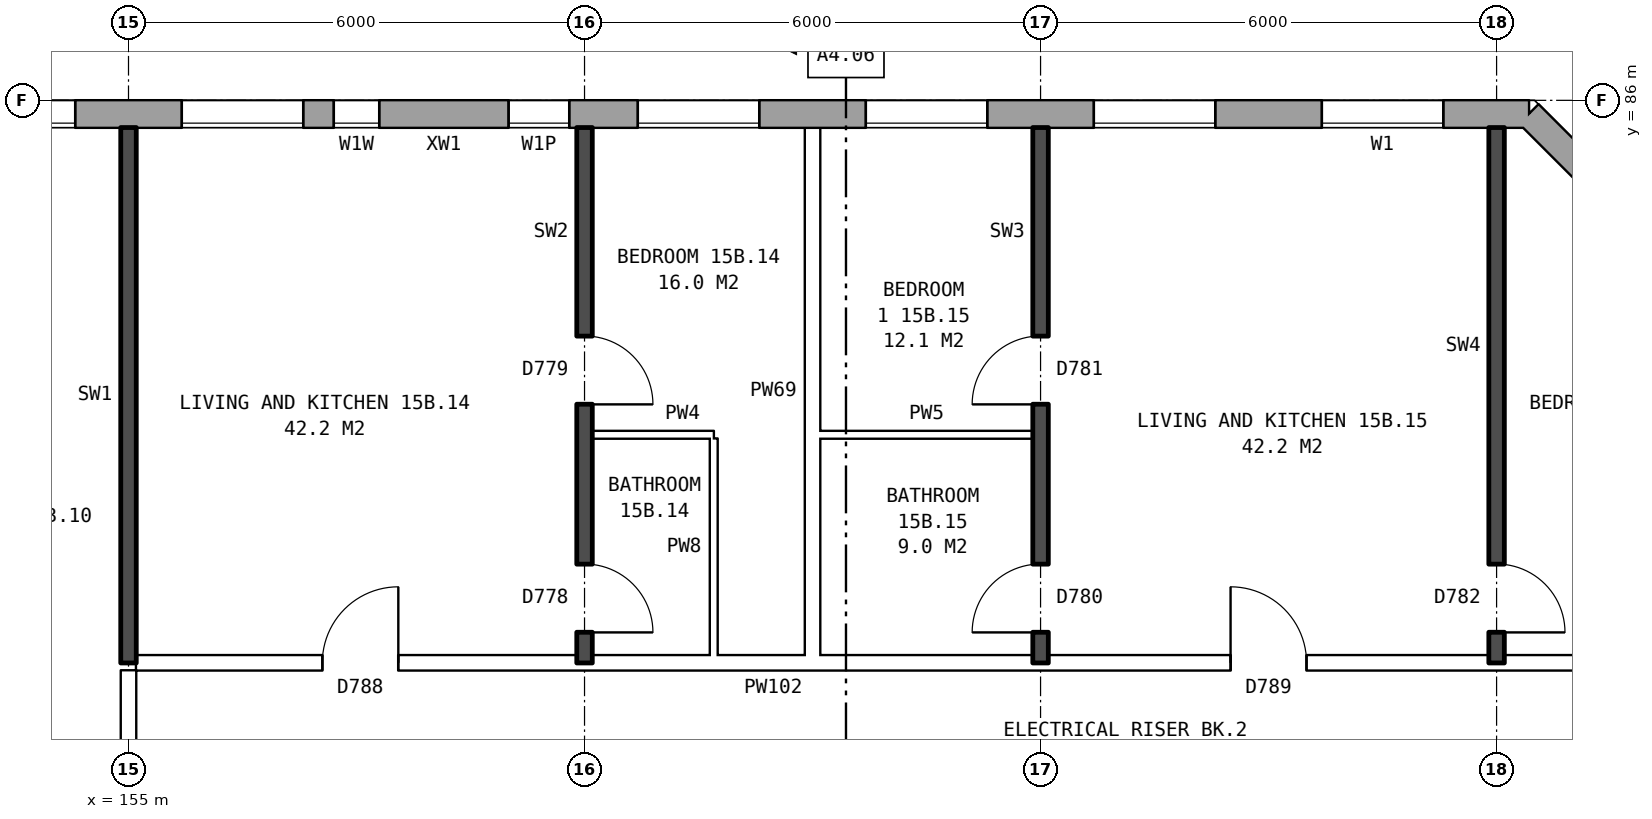
"""IFC4 building model, lengths in metres.
Left out: names, types, materials, properties, quantities, classifications, styles, units other than length and angle.
Written with IfcOpenShell. Run it as: python <this file> out.ifc"""

import sys

from ifc_helpers import new_model, si_unit, direction, frame, frame_2d, origin, place, context, subcontext, project, spatial, rectangle, extrude, element, fill, save


model = new_model("IFC4")
c1 = context("Model", 3, precision=1e-05, world=origin(), true_north=direction((0.0, 1.0)))
c2 = subcontext(c1, "Body", "Model", "MODEL_VIEW")
j1 = project(units=[si_unit("LENGTHUNIT", "METRE"), si_unit("PLANEANGLEUNIT", "RADIAN")], contexts=[c1])
p1 = place(None, origin())
s1 = spatial("IfcSite", under=j1, at=p1, CompositionType="ELEMENT")
p2 = place(p1, origin())
s2 = spatial("IfcBuilding", under=s1, at=p2, CompositionType="ELEMENT")
p3 = place(p2, frame((0.0, 0.0, 56.7)))
s3 = spatial("IfcBuildingStorey", under=s2, at=p3, CompositionType="ELEMENT", Elevation=56.7)
p4 = place(p3, frame((176.32, 82.925, 0.0), z_axis=(0.0, 0.0, 1.0), x_axis=(-0.707106781187, 0.707106781187, 0.0)))
e1 = element("IfcWall", 1, at=p4, inside=s3, PredefinedType="STANDARD", context=c2, shape_type="SweptSolid", body=[
    extrude(rectangle(XDim=4.094, YDim=0.36, at=frame_2d((2.047, 0.0))), origin(), (0.0, 0.0, 1.0), 2.85),
])
p5 = place(p4, frame((1.247, 0.0, 0.8)))
e2 = element("IfcOpeningElement", 2, at=p5, cuts=e1, PredefinedType="OPENING", context=c2, shape_type="SweptSolid", body=[
    extrude(rectangle(XDim=1.6, YDim=1.8, at=frame_2d((0.8, 0.9))), frame((0.0, 0.19, 0.0), z_axis=(0.0, -1.0, 0.0), x_axis=(1.0, 0.0, 0.0)), (0.0, 0.0, 1.0), 0.38),
])
p6 = place(p3, frame((173.425, 85.82, 0.0), z_axis=(0.0, 0.0, 1.0), x_axis=(-1.0, 0.0, 0.0)))
e3 = element("IfcWall", 3, at=p6, inside=s3, PredefinedType="STANDARD", context=c2, shape_type="SweptSolid", body=[
    extrude(rectangle(XDim=39.351, YDim=0.36, at=frame_2d((19.675, 0.0))), origin(), (0.0, 0.0, 1.0), 2.85),
])
p7 = place(p6, frame((1.125, 0.0, 0.8)))
e4 = element("IfcOpeningElement", 4, at=p7, cuts=e3, PredefinedType="OPENING", context=c2, shape_type="SweptSolid", body=[
    extrude(rectangle(XDim=1.6, YDim=1.8, at=frame_2d((0.8, 0.9))), frame((0.0, 0.19, 0.0), z_axis=(0.0, -1.0, 0.0), x_axis=(1.0, 0.0, 0.0)), (0.0, 0.0, 1.0), 0.38),
])
p8 = place(p6, frame((4.125, 0.0, 0.8)))
e5 = element("IfcOpeningElement", 5, at=p8, cuts=e3, PredefinedType="OPENING", context=c2, shape_type="SweptSolid", body=[
    extrude(rectangle(XDim=1.6, YDim=1.8, at=frame_2d((0.8, 0.9))), frame((0.0, 0.19, 0.0), z_axis=(0.0, -1.0, 0.0), x_axis=(1.0, 0.0, 0.0)), (0.0, 0.0, 1.0), 0.38),
])
p9 = place(p6, frame((7.125, 0.0, 0.8)))
e6 = element("IfcOpeningElement", 6, at=p9, cuts=e3, PredefinedType="OPENING", context=c2, shape_type="SweptSolid", body=[
    extrude(rectangle(XDim=1.6, YDim=1.8, at=frame_2d((0.8, 0.9))), frame((0.0, 0.19, 0.0), z_axis=(0.0, -1.0, 0.0), x_axis=(1.0, 0.0, 0.0)), (0.0, 0.0, 1.0), 0.38),
])
p10 = place(p6, frame((10.125, 0.0, 0.8)))
e7 = element("IfcOpeningElement", 7, at=p10, cuts=e3, PredefinedType="OPENING", context=c2, shape_type="SweptSolid", body=[
    extrude(rectangle(XDim=1.6, YDim=1.8, at=frame_2d((0.8, 0.9))), frame((0.0, 0.19, 0.0), z_axis=(0.0, -1.0, 0.0), x_axis=(1.0, 0.0, 0.0)), (0.0, 0.0, 1.0), 0.38),
])
p11 = place(p6, frame((12.625, 0.0, 1.25)))
e8 = element("IfcOpeningElement", 8, at=p11, cuts=e3, PredefinedType="OPENING", context=c2, shape_type="SweptSolid", body=[
    extrude(rectangle(XDim=0.8, YDim=1.2, at=frame_2d((0.4, 0.6))), frame((0.0, 0.19, 0.0), z_axis=(0.0, -1.0, 0.0), x_axis=(1.0, 0.0, 0.0)), (0.0, 0.0, 1.0), 0.38),
])
p12 = place(p6, frame((16.125, 0.0, 0.8)))
e9 = element("IfcOpeningElement", 9, at=p12, cuts=e3, PredefinedType="OPENING", context=c2, shape_type="SweptSolid", body=[
    extrude(rectangle(XDim=1.6, YDim=1.8, at=frame_2d((0.8, 0.9))), frame((0.0, 0.19, 0.0), z_axis=(0.0, -1.0, 0.0), x_axis=(1.0, 0.0, 0.0)), (0.0, 0.0, 1.0), 0.38),
])
p13 = place(p6, frame((19.125, 0.0, 0.8)))
e10 = element("IfcOpeningElement", 10, at=p13, cuts=e3, PredefinedType="OPENING", context=c2, shape_type="SweptSolid", body=[
    extrude(rectangle(XDim=1.6, YDim=1.8, at=frame_2d((0.8, 0.9))), frame((0.0, 0.19, 0.0), z_axis=(0.0, -1.0, 0.0), x_axis=(1.0, 0.0, 0.0)), (0.0, 0.0, 1.0), 0.38),
])
p14 = place(p6, frame((21.575, 0.0, 0.8)))
e11 = element("IfcOpeningElement", 11, at=p14, cuts=e3, PredefinedType="OPENING", context=c2, shape_type="SweptSolid", body=[
    extrude(rectangle(XDim=1.4, YDim=1.8, at=frame_2d((0.7, 0.9))), frame((0.0, 0.19, 0.0), z_axis=(0.0, -1.0, 0.0), x_axis=(1.0, 0.0, 0.0)), (0.0, 0.0, 1.0), 0.38),
])
p15 = place(p6, frame((25.275, 0.0, 1.7)))
e12 = element("IfcOpeningElement", 12, at=p15, cuts=e3, PredefinedType="OPENING", context=c2, shape_type="SweptSolid", body=[
    extrude(rectangle(XDim=0.8, YDim=0.9, at=frame_2d((0.4, 0.45))), frame((0.0, 0.19, 0.0), z_axis=(0.0, -1.0, 0.0), x_axis=(1.0, 0.0, 0.0)), (0.0, 0.0, 1.0), 0.38),
])
p16 = place(p6, frame((28.125, 0.0, 0.8)))
e13 = element("IfcOpeningElement", 13, at=p16, cuts=e3, PredefinedType="OPENING", context=c2, shape_type="SweptSolid", body=[
    extrude(rectangle(XDim=1.6, YDim=1.8, at=frame_2d((0.8, 0.9))), frame((0.0, 0.19, 0.0), z_axis=(0.0, -1.0, 0.0), x_axis=(1.0, 0.0, 0.0)), (0.0, 0.0, 1.0), 0.38),
])
p17 = place(p6, frame((31.125, 0.0, 0.8)))
e14 = element("IfcOpeningElement", 14, at=p17, cuts=e3, PredefinedType="OPENING", context=c2, shape_type="SweptSolid", body=[
    extrude(rectangle(XDim=1.6, YDim=1.8, at=frame_2d((0.8, 0.9))), frame((0.0, 0.19, 0.0), z_axis=(0.0, -1.0, 0.0), x_axis=(1.0, 0.0, 0.0)), (0.0, 0.0, 1.0), 0.38),
])
p18 = place(p6, frame((34.125, 0.0, 0.8)))
e15 = element("IfcOpeningElement", 15, at=p18, cuts=e3, PredefinedType="OPENING", context=c2, shape_type="SweptSolid", body=[
    extrude(rectangle(XDim=1.6, YDim=1.8, at=frame_2d((0.8, 0.9))), frame((0.0, 0.19, 0.0), z_axis=(0.0, -1.0, 0.0), x_axis=(1.0, 0.0, 0.0)), (0.0, 0.0, 1.0), 0.38),
])
p19 = place(p6, frame((37.125, 0.0, 0.8)))
e16 = element("IfcOpeningElement", 16, at=p19, cuts=e3, PredefinedType="OPENING", context=c2, shape_type="SweptSolid", body=[
    extrude(rectangle(XDim=1.6, YDim=1.8, at=frame_2d((0.8, 0.9))), frame((0.0, 0.19, 0.0), z_axis=(0.0, -1.0, 0.0), x_axis=(1.0, 0.0, 0.0)), (0.0, 0.0, 1.0), 0.38),
])
p20 = place(p6, frame((15.125, 0.0, 0.65)))
e17 = element("IfcOpeningElement", 17, at=p20, cuts=e3, PredefinedType="OPENING", context=c2, shape_type="SweptSolid", body=[
    extrude(rectangle(XDim=0.6, YDim=0.9, at=frame_2d((0.3, 0.45))), frame((0.0, 0.19, 0.0), z_axis=(0.0, -1.0, 0.0), x_axis=(1.0, 0.0, 0.0)), (0.0, 0.0, 1.0), 0.38),
])
p21 = place(p6, frame((23.275, 0.0, 0.8)))
e18 = element("IfcOpeningElement", 18, at=p21, cuts=e3, PredefinedType="OPENING", context=c2, shape_type="SweptSolid", body=[
    extrude(rectangle(XDim=0.8, YDim=0.9, at=frame_2d((0.4, 0.45))), frame((0.0, 0.19, 0.0), z_axis=(0.0, -1.0, 0.0), x_axis=(1.0, 0.0, 0.0)), (0.0, 0.0, 1.0), 0.38),
])
p22 = place(p6, frame((26.375, 0.0, 0.8)))
e19 = element("IfcOpeningElement", 19, at=p22, cuts=e3, PredefinedType="OPENING", context=c2, shape_type="SweptSolid", body=[
    extrude(rectangle(XDim=0.8, YDim=1.8, at=frame_2d((0.4, 0.9))), frame((0.0, 0.19, 0.0), z_axis=(0.0, -1.0, 0.0), x_axis=(1.0, 0.0, 0.0)), (0.0, 0.0, 1.0), 0.38),
])
p23 = place(p3, frame((155.1, 78.6, 0.0), z_axis=(0.0, 0.0, 1.0), x_axis=(1.0, 0.0, 0.0)))
e20 = element("IfcWall", 20, at=p23, inside=s3, PredefinedType="PARTITIONING", context=c2, shape_type="SweptSolid", body=[
    extrude(rectangle(XDim=21.04, YDim=0.2, at=frame_2d((10.52, 0.0))), origin(), (0.0, 0.0, 1.0), 2.85),
])
p24 = place(p23, frame((2.45, 0.0, 0.0)))
e21 = element("IfcOpeningElement", 21, at=p24, cuts=e20, PredefinedType="OPENING", context=c2, shape_type="SweptSolid", body=[
    extrude(rectangle(XDim=1.0, YDim=2.1, at=frame_2d((0.5, 1.05))), frame((0.0, 0.11, 0.0), z_axis=(0.0, -1.0, 0.0), x_axis=(1.0, 0.0, 0.0)), (0.0, 0.0, 1.0), 0.22),
])
p25 = place(p23, frame((14.4, 0.0, 0.0)))
e22 = element("IfcOpeningElement", 22, at=p25, cuts=e20, PredefinedType="OPENING", context=c2, shape_type="SweptSolid", body=[
    extrude(rectangle(XDim=1.0, YDim=2.1, at=frame_2d((0.5, 1.05))), frame((0.0, 0.11, 0.0), z_axis=(0.0, -1.0, 0.0), x_axis=(1.0, 0.0, 0.0)), (0.0, 0.0, 1.0), 0.22),
])
p26 = place(p3, frame((161.1, 81.6, 0.0), z_axis=(0.0, 0.0, 1.0), x_axis=(1.0, 0.0, 0.0)))
e23 = element("IfcWall", 23, at=p26, inside=s3, PredefinedType="PARTITIONING", context=c2, shape_type="SweptSolid", body=[
    extrude(rectangle(XDim=1.6, YDim=0.1, at=frame_2d((0.8, 0.0))), origin(), (0.0, 0.0, 1.0), 2.85),
])
p27 = place(p3, frame((164.1, 81.6, 0.0), z_axis=(0.0, 0.0, 1.0), x_axis=(1.0, 0.0, 0.0)))
e24 = element("IfcWall", 24, at=p27, inside=s3, PredefinedType="PARTITIONING", context=c2, shape_type="SweptSolid", body=[
    extrude(rectangle(XDim=2.8, YDim=0.1, at=frame_2d((1.4, 0.0))), origin(), (0.0, 0.0, 1.0), 2.85),
])
p28 = place(p3, frame((155.0, 76.3, 0.0), z_axis=(0.0, 0.0, 1.0), x_axis=(0.0, 1.0, 0.0)))
e25 = element("IfcWall", 25, at=p28, inside=s3, PredefinedType="PARTITIONING", context=c2, shape_type="SweptSolid", body=[
    extrude(rectangle(XDim=2.2, YDim=0.2, at=frame_2d((1.1, 0.0))), origin(), (0.0, 0.0, 1.0), 2.85),
])
p29 = place(p3, frame((155.0, 78.6, 0.0), z_axis=(0.0, 0.0, 1.0), x_axis=(0.0, 1.0, 0.0)))
e26 = element("IfcWall", 26, at=p29, inside=s3, PredefinedType="SOLIDWALL", context=c2, shape_type="SweptSolid", body=[
    extrude(rectangle(XDim=7.04, YDim=0.2, at=frame_2d((3.52, 0.0))), origin(), (0.0, 0.0, 1.0), 2.85),
])
p30 = place(p3, frame((161.0, 78.6, 0.0), z_axis=(0.0, 0.0, 1.0), x_axis=(0.0, 1.0, 0.0)))
e27 = element("IfcWall", 27, at=p30, inside=s3, PredefinedType="SOLIDWALL", context=c2, shape_type="SweptSolid", body=[
    extrude(rectangle(XDim=7.04, YDim=0.2, at=frame_2d((3.52, 0.0))), origin(), (0.0, 0.0, 1.0), 2.85),
])
p31 = place(p30, frame((3.4, 0.0, 0.0)))
e28 = element("IfcOpeningElement", 28, at=p31, cuts=e27, PredefinedType="OPENING", context=c2, shape_type="SweptSolid", body=[
    extrude(rectangle(XDim=0.9, YDim=2.1, at=frame_2d((0.45, 1.05))), frame((0.0, 0.11, 0.0), z_axis=(0.0, -1.0, 0.0), x_axis=(1.0, 0.0, 0.0)), (0.0, 0.0, 1.0), 0.22),
])
p32 = place(p30, frame((0.4, 0.0, 0.0)))
e29 = element("IfcOpeningElement", 29, at=p32, cuts=e27, PredefinedType="OPENING", context=c2, shape_type="SweptSolid", body=[
    extrude(rectangle(XDim=0.9, YDim=2.1, at=frame_2d((0.45, 1.05))), frame((0.0, 0.11, 0.0), z_axis=(0.0, -1.0, 0.0), x_axis=(1.0, 0.0, 0.0)), (0.0, 0.0, 1.0), 0.22),
])
p33 = place(p3, frame((162.7, 78.7, 0.0), z_axis=(0.0, 0.0, 1.0), x_axis=(0.0, 1.0, 0.0)))
e30 = element("IfcWall", 30, at=p33, inside=s3, PredefinedType="PARTITIONING", context=c2, shape_type="SweptSolid", body=[
    extrude(rectangle(XDim=2.85, YDim=0.1, at=frame_2d((1.425, 0.0))), origin(), (0.0, 0.0, 1.0), 2.85),
])
p34 = place(p3, frame((164.0, 78.7, 0.0), z_axis=(0.0, 0.0, 1.0), x_axis=(0.0, 1.0, 0.0)))
e31 = element("IfcWall", 31, at=p34, inside=s3, PredefinedType="PARTITIONING", context=c2, shape_type="SweptSolid", body=[
    extrude(rectangle(XDim=6.94, YDim=0.2, at=frame_2d((3.47, 0.0))), origin(), (0.0, 0.0, 1.0), 2.85),
])
p35 = place(p3, frame((167.0, 78.6, 0.0), z_axis=(0.0, 0.0, 1.0), x_axis=(0.0, 1.0, 0.0)))
e32 = element("IfcWall", 32, at=p35, inside=s3, PredefinedType="SOLIDWALL", context=c2, shape_type="SweptSolid", body=[
    extrude(rectangle(XDim=7.04, YDim=0.2, at=frame_2d((3.52, 0.0))), origin(), (0.0, 0.0, 1.0), 2.85),
])
p36 = place(p35, frame((3.4, 0.0, 0.0)))
e33 = element("IfcOpeningElement", 33, at=p36, cuts=e32, PredefinedType="OPENING", context=c2, shape_type="SweptSolid", body=[
    extrude(rectangle(XDim=0.9, YDim=2.1, at=frame_2d((0.45, 1.05))), frame((0.0, 0.11, 0.0), z_axis=(0.0, -1.0, 0.0), x_axis=(1.0, 0.0, 0.0)), (0.0, 0.0, 1.0), 0.22),
])
p37 = place(p35, frame((0.4, 0.0, 0.0)))
e34 = element("IfcOpeningElement", 34, at=p37, cuts=e32, PredefinedType="OPENING", context=c2, shape_type="SweptSolid", body=[
    extrude(rectangle(XDim=0.9, YDim=2.1, at=frame_2d((0.45, 1.05))), frame((0.0, 0.11, 0.0), z_axis=(0.0, -1.0, 0.0), x_axis=(1.0, 0.0, 0.0)), (0.0, 0.0, 1.0), 0.22),
])
p38 = place(p3, frame((173.0, 78.6, 0.0), z_axis=(0.0, 0.0, 1.0), x_axis=(0.0, 1.0, 0.0)))
e35 = element("IfcWall", 35, at=p38, inside=s3, PredefinedType="SOLIDWALL", context=c2, shape_type="SweptSolid", body=[
    extrude(rectangle(XDim=7.04, YDim=0.2, at=frame_2d((3.52, 0.0))), origin(), (0.0, 0.0, 1.0), 2.85),
])
p39 = place(p38, frame((0.4, 0.0, 0.0)))
e36 = element("IfcOpeningElement", 36, at=p39, cuts=e35, PredefinedType="OPENING", context=c2, shape_type="SweptSolid", body=[
    extrude(rectangle(XDim=0.9, YDim=2.1, at=frame_2d((0.45, 1.05))), frame((0.0, 0.11, 0.0), z_axis=(0.0, -1.0, 0.0), x_axis=(1.0, 0.0, 0.0)), (0.0, 0.0, 1.0), 0.22),
])
p40 = place(p7, origin())
e37 = element("IfcWindow", 37, at=p40, inside=s3, PartitioningType="SINGLE_PANEL", PredefinedType="WINDOW", context=c2, shape_type="SweptSolid", body=[
    extrude(rectangle(XDim=1.6, YDim=1.8, at=frame_2d((0.8, 0.9))), frame((0.0, 0.15, 0.0), z_axis=(0.0, -1.0, 0.0), x_axis=(1.0, 0.0, 0.0)), (0.0, 0.0, 1.0), 0.06),
])
fill(e4, e37)
p41 = place(p8, origin())
e38 = element("IfcWindow", 38, at=p41, inside=s3, PartitioningType="SINGLE_PANEL", PredefinedType="WINDOW", context=c2, shape_type="SweptSolid", body=[
    extrude(rectangle(XDim=1.6, YDim=1.8, at=frame_2d((0.8, 0.9))), frame((0.0, 0.15, 0.0), z_axis=(0.0, -1.0, 0.0), x_axis=(1.0, 0.0, 0.0)), (0.0, 0.0, 1.0), 0.06),
])
fill(e5, e38)
p42 = place(p9, origin())
e39 = element("IfcWindow", 39, at=p42, inside=s3, PartitioningType="SINGLE_PANEL", PredefinedType="WINDOW", context=c2, shape_type="SweptSolid", body=[
    extrude(rectangle(XDim=1.6, YDim=1.8, at=frame_2d((0.8, 0.9))), frame((0.0, 0.15, 0.0), z_axis=(0.0, -1.0, 0.0), x_axis=(1.0, 0.0, 0.0)), (0.0, 0.0, 1.0), 0.06),
])
fill(e6, e39)
p43 = place(p10, origin())
e40 = element("IfcWindow", 40, at=p43, inside=s3, PartitioningType="SINGLE_PANEL", PredefinedType="WINDOW", context=c2, shape_type="SweptSolid", body=[
    extrude(rectangle(XDim=1.6, YDim=1.8, at=frame_2d((0.8, 0.9))), frame((0.0, 0.15, 0.0), z_axis=(0.0, -1.0, 0.0), x_axis=(1.0, 0.0, 0.0)), (0.0, 0.0, 1.0), 0.06),
])
fill(e7, e40)
p44 = place(p11, origin())
e41 = element("IfcWindow", 41, at=p44, inside=s3, PartitioningType="SINGLE_PANEL", PredefinedType="WINDOW", context=c2, shape_type="SweptSolid", body=[
    extrude(rectangle(XDim=0.8, YDim=1.2, at=frame_2d((0.4, 0.6))), frame((0.0, 0.15, 0.0), z_axis=(0.0, -1.0, 0.0), x_axis=(1.0, 0.0, 0.0)), (0.0, 0.0, 1.0), 0.06),
])
fill(e8, e41)
p45 = place(p12, origin())
e42 = element("IfcWindow", 42, at=p45, inside=s3, PartitioningType="SINGLE_PANEL", PredefinedType="WINDOW", context=c2, shape_type="SweptSolid", body=[
    extrude(rectangle(XDim=1.6, YDim=1.8, at=frame_2d((0.8, 0.9))), frame((0.0, 0.15, 0.0), z_axis=(0.0, -1.0, 0.0), x_axis=(1.0, 0.0, 0.0)), (0.0, 0.0, 1.0), 0.06),
])
fill(e9, e42)
p46 = place(p13, origin())
e43 = element("IfcWindow", 43, at=p46, inside=s3, PartitioningType="SINGLE_PANEL", PredefinedType="WINDOW", context=c2, shape_type="SweptSolid", body=[
    extrude(rectangle(XDim=1.6, YDim=1.8, at=frame_2d((0.8, 0.9))), frame((0.0, 0.15, 0.0), z_axis=(0.0, -1.0, 0.0), x_axis=(1.0, 0.0, 0.0)), (0.0, 0.0, 1.0), 0.06),
])
fill(e10, e43)
p47 = place(p31, frame((0.9, 0.0, 0.0), z_axis=(0.0, 0.0, 1.0), x_axis=(-1.0, 0.0, 0.0)))
e44 = element("IfcDoor", 44, at=p47, inside=s3, OperationType="SINGLE_SWING_RIGHT", PredefinedType="DOOR", context=c2, shape_type="SweptSolid", body=[
    extrude(rectangle(XDim=0.9, YDim=2.1, at=frame_2d((0.45, 1.05))), frame((0.0, 0.025, 0.0), z_axis=(0.0, -1.0, 0.0), x_axis=(1.0, 0.0, 0.0)), (0.0, 0.0, 1.0), 0.05),
])
fill(e28, e44)
p48 = place(p24, origin())
e45 = element("IfcDoor", 45, at=p48, inside=s3, OperationType="SINGLE_SWING_RIGHT", PredefinedType="DOOR", context=c2, shape_type="SweptSolid", body=[
    extrude(rectangle(XDim=1.0, YDim=2.1, at=frame_2d((0.5, 1.05))), frame((0.0, 0.025, 0.0), z_axis=(0.0, -1.0, 0.0), x_axis=(1.0, 0.0, 0.0)), (0.0, 0.0, 1.0), 0.05),
])
fill(e21, e45)
p49 = place(p32, frame((0.9, 0.0, 0.0), z_axis=(0.0, 0.0, 1.0), x_axis=(-1.0, 0.0, 0.0)))
e46 = element("IfcDoor", 46, at=p49, inside=s3, OperationType="SINGLE_SWING_RIGHT", PredefinedType="DOOR", context=c2, shape_type="SweptSolid", body=[
    extrude(rectangle(XDim=0.9, YDim=2.1, at=frame_2d((0.45, 1.05))), frame((0.0, 0.025, 0.0), z_axis=(0.0, -1.0, 0.0), x_axis=(1.0, 0.0, 0.0)), (0.0, 0.0, 1.0), 0.05),
])
fill(e29, e46)
p50 = place(p36, origin())
e47 = element("IfcDoor", 47, at=p50, inside=s3, OperationType="SINGLE_SWING_LEFT", PredefinedType="DOOR", context=c2, shape_type="SweptSolid", body=[
    extrude(rectangle(XDim=0.9, YDim=2.1, at=frame_2d((0.45, 1.05))), frame((0.0, 0.025, 0.0), z_axis=(0.0, -1.0, 0.0), x_axis=(1.0, 0.0, 0.0)), (0.0, 0.0, 1.0), 0.05),
])
fill(e33, e47)
p51 = place(p39, frame((0.9, 0.0, 0.0), z_axis=(0.0, 0.0, 1.0), x_axis=(-1.0, 0.0, 0.0)))
e48 = element("IfcDoor", 48, at=p51, inside=s3, OperationType="SINGLE_SWING_RIGHT", PredefinedType="DOOR", context=c2, shape_type="SweptSolid", body=[
    extrude(rectangle(XDim=0.9, YDim=2.1, at=frame_2d((0.45, 1.05))), frame((0.0, 0.025, 0.0), z_axis=(0.0, -1.0, 0.0), x_axis=(1.0, 0.0, 0.0)), (0.0, 0.0, 1.0), 0.05),
])
fill(e36, e48)
p52 = place(p25, origin())
e49 = element("IfcDoor", 49, at=p52, inside=s3, OperationType="SINGLE_SWING_LEFT", PredefinedType="DOOR", context=c2, shape_type="SweptSolid", body=[
    extrude(rectangle(XDim=1.0, YDim=2.1, at=frame_2d((0.5, 1.05))), frame((0.0, 0.025, 0.0), z_axis=(0.0, -1.0, 0.0), x_axis=(1.0, 0.0, 0.0)), (0.0, 0.0, 1.0), 0.05),
])
fill(e22, e49)
p53 = place(p37, origin())
e50 = element("IfcDoor", 50, at=p53, inside=s3, OperationType="SINGLE_SWING_LEFT", PredefinedType="DOOR", context=c2, shape_type="SweptSolid", body=[
    extrude(rectangle(XDim=0.9, YDim=2.1, at=frame_2d((0.45, 1.05))), frame((0.0, 0.025, 0.0), z_axis=(0.0, -1.0, 0.0), x_axis=(1.0, 0.0, 0.0)), (0.0, 0.0, 1.0), 0.05),
])
fill(e34, e50)
p54 = place(p20, origin())
e51 = element("IfcWindow", 51, at=p54, inside=s3, PartitioningType="SINGLE_PANEL", PredefinedType="WINDOW", context=c2, shape_type="SweptSolid", body=[
    extrude(rectangle(XDim=0.6, YDim=0.9, at=frame_2d((0.3, 0.45))), frame((0.0, 0.15, 0.0), z_axis=(0.0, -1.0, 0.0), x_axis=(1.0, 0.0, 0.0)), (0.0, 0.0, 1.0), 0.06),
])
fill(e17, e51)
save(model, sys.argv[1])
